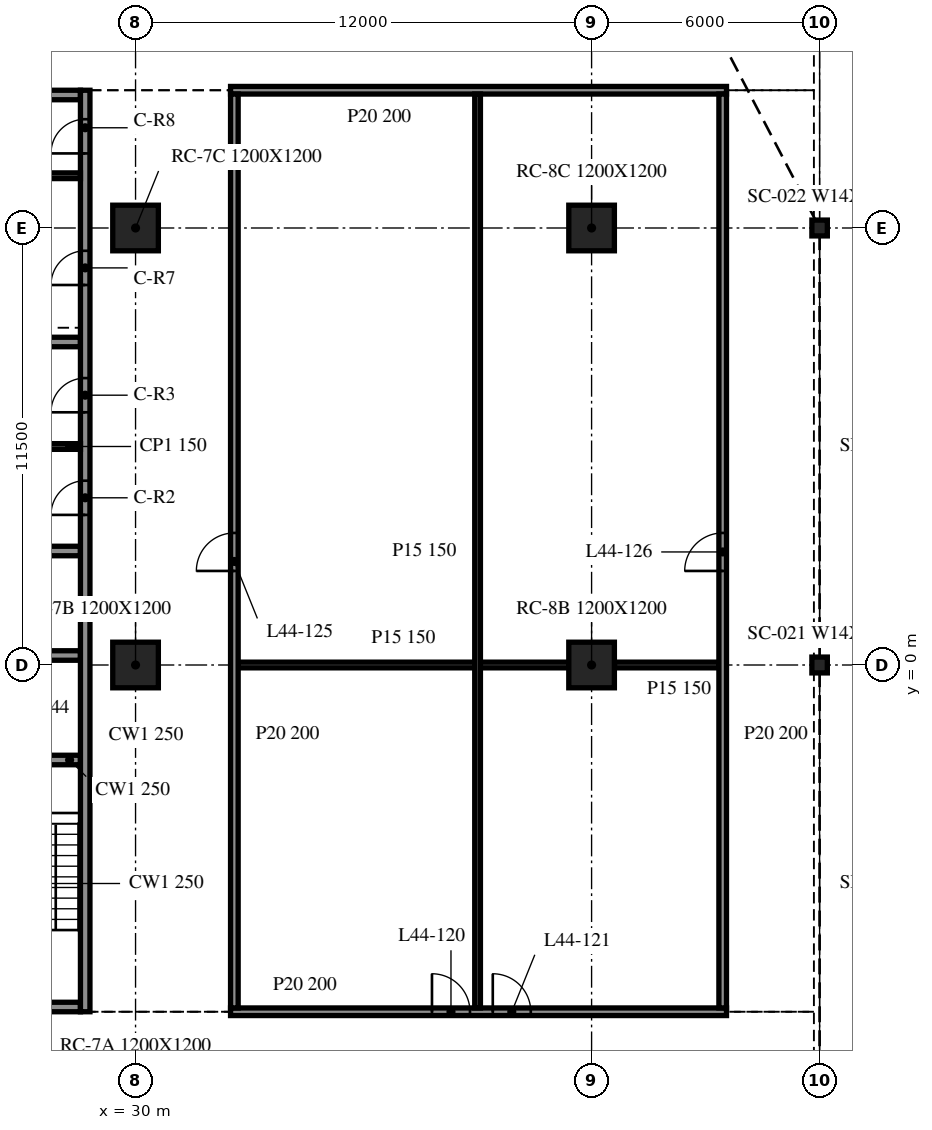
"""IFC4 building model, lengths in metres.
Left out: names, types, materials, properties, quantities, classifications, styles, units other than length and angle.
Written with IfcOpenShell. Run it as: python <this file> out.ifc"""

import sys

from ifc_helpers import new_model, si_unit, direction, frame, frame_2d, origin, origin_2d, place, context, subcontext, project, spatial, rectangle, i_section, extrude, element, fill, save


model = new_model("IFC4")
c1 = context("Model", 3, precision=1e-05, world=origin(), true_north=direction((0.0, 1.0)))
c2 = subcontext(c1, "Body", "Model", "MODEL_VIEW")
j1 = project(units=[si_unit("LENGTHUNIT", "METRE"), si_unit("PLANEANGLEUNIT", "RADIAN")], contexts=[c1])
p1 = place(None, origin())
s1 = spatial("IfcSite", under=j1, at=p1, CompositionType="ELEMENT")
p2 = place(p1, origin())
s2 = spatial("IfcBuilding", under=s1, at=p2, CompositionType="ELEMENT")
p3 = place(p2, frame((0.0, 0.0, 185.8)))
s3 = spatial("IfcBuildingStorey", under=s2, at=p3, CompositionType="ELEMENT", Elevation=185.8)
for number, where, z_axis, x_axis in (
    (1, (30.0, 0.0, -0.34), (0.0, 0.0, 1.0), (1.0, 0.0, 0.0)),
    (2, (30.0, 11.5, -0.34), (0.0, 0.0, 1.0), (1.0, 0.0, 0.0)),
    (3, (42.0, 0.0, -0.34), (0.0, 0.0, 1.0), (1.0, 0.0, 0.0)),
    (4, (42.0, 11.5, -0.34), (0.0, 0.0, 1.0), (1.0, 0.0, 0.0)),
):
    element("IfcColumn", number, at=place(p3, frame(where, z_axis=z_axis, x_axis=x_axis)), inside=s3, PredefinedType="COLUMN", context=c2, shape_type="SweptSolid", body=[
        extrude(rectangle(XDim=1.2, YDim=1.2, at=origin_2d()), origin(), (0.0, 0.0, 1.0), 3.74),
    ])
for number, where, z_axis, x_axis in (
    (5, (48.0, 0.0, -0.34), (0.0, 0.0, 1.0), (1.0, 0.0, 0.0)),
    (6, (48.0, 11.5, -0.34), (0.0, 0.0, 1.0), (1.0, 0.0, 0.0)),
):
    element("IfcColumn", number, at=place(p3, frame(where, z_axis=z_axis, x_axis=x_axis)), inside=s3, PredefinedType="COLUMN", context=c2, shape_type="SweptSolid", body=[
        extrude(i_section(OverallWidth=0.406, OverallDepth=0.417, WebThickness=0.03, FlangeThickness=0.048, at=origin_2d()), origin(), (0.0, 0.0, 1.0), 3.74),
    ])
p4 = place(p3, frame((28.675, -9.125, 0.0), z_axis=(0.0, 0.0, 1.0), x_axis=(0.0, 1.0, 0.0)))
e7 = element("IfcWall", 7, at=p4, inside=s3, PredefinedType="SOLIDWALL", context=c2, shape_type="SweptSolid", body=[
    extrude(rectangle(XDim=24.25, YDim=0.25, at=frame_2d((12.125, 0.0))), origin(), (0.0, 0.0, 1.0), 3.4),
])
p5 = place(p4, frame((13.075, 0.0, 0.0)))
e8 = element("IfcOpeningElement", 8, at=p5, cuts=e7, PredefinedType="OPENING", context=c2, shape_type="SweptSolid", body=[
    extrude(rectangle(XDim=0.9, YDim=2.1, at=frame_2d((0.45, 1.05))), frame((0.0, 0.135, 0.0), z_axis=(0.0, -1.0, 0.0), x_axis=(1.0, 0.0, 0.0)), (0.0, 0.0, 1.0), 0.27),
])
p6 = place(p4, frame((15.775, 0.0, 0.0)))
e9 = element("IfcOpeningElement", 9, at=p6, cuts=e7, PredefinedType="OPENING", context=c2, shape_type="SweptSolid", body=[
    extrude(rectangle(XDim=0.9, YDim=2.1, at=frame_2d((0.45, 1.05))), frame((0.0, 0.135, 0.0), z_axis=(0.0, -1.0, 0.0), x_axis=(1.0, 0.0, 0.0)), (0.0, 0.0, 1.0), 0.27),
])
p7 = place(p4, frame((19.125, 0.0, 0.0)))
e10 = element("IfcOpeningElement", 10, at=p7, cuts=e7, PredefinedType="OPENING", context=c2, shape_type="SweptSolid", body=[
    extrude(rectangle(XDim=0.9, YDim=2.1, at=frame_2d((0.45, 1.05))), frame((0.0, 0.135, 0.0), z_axis=(0.0, -1.0, 0.0), x_axis=(1.0, 0.0, 0.0)), (0.0, 0.0, 1.0), 0.27),
])
p8 = place(p4, frame((22.587, 0.0, 0.0)))
e11 = element("IfcOpeningElement", 11, at=p8, cuts=e7, PredefinedType="OPENING", context=c2, shape_type="SweptSolid", body=[
    extrude(rectangle(XDim=0.9, YDim=2.1, at=frame_2d((0.45, 1.05))), frame((0.0, 0.135, 0.0), z_axis=(0.0, -1.0, 0.0), x_axis=(1.0, 0.0, 0.0)), (0.0, 0.0, 1.0), 0.27),
])
p9 = place(p3, frame((28.55, -9.0, 0.0), z_axis=(0.0, 0.0, 1.0), x_axis=(-1.0, 0.0, 0.0)))
e12 = element("IfcWall", 12, at=p9, inside=s3, PredefinedType="SOLIDWALL", context=c2, shape_type="SweptSolid", body=[
    extrude(rectangle(XDim=9.1, YDim=0.25, at=frame_2d((4.55, 0.0))), origin(), (0.0, 0.0, 1.0), 3.4),
])
p10 = place(p9, frame((3.65, 0.0, 0.0)))
e13 = element("IfcOpeningElement", 13, at=p10, cuts=e12, PredefinedType="OPENING", context=c2, shape_type="SweptSolid", body=[
    extrude(rectangle(XDim=1.8, YDim=2.1, at=frame_2d((0.9, 1.05))), frame((0.0, 0.135, 0.0), z_axis=(0.0, -1.0, 0.0), x_axis=(1.0, 0.0, 0.0)), (0.0, 0.0, 1.0), 0.27),
])
p11 = place(p3, frame((19.45, 15.0, 0.0), z_axis=(0.0, 0.0, 1.0), x_axis=(1.0, 0.0, 0.0)))
e14 = element("IfcWall", 14, at=p11, inside=s3, PredefinedType="SOLIDWALL", context=c2, shape_type="SweptSolid", body=[
    extrude(rectangle(XDim=9.1, YDim=0.25, at=frame_2d((4.55, 0.0))), origin(), (0.0, 0.0, 1.0), 3.4),
])
p12 = place(p11, frame((3.65, 0.0, 0.0)))
e15 = element("IfcOpeningElement", 15, at=p12, cuts=e14, PredefinedType="OPENING", context=c2, shape_type="SweptSolid", body=[
    extrude(rectangle(XDim=1.8, YDim=2.1, at=frame_2d((0.9, 1.05))), frame((0.0, 0.135, 0.0), z_axis=(0.0, -1.0, 0.0), x_axis=(1.0, 0.0, 0.0)), (0.0, 0.0, 1.0), 0.27),
])
for number, where, z_axis, x_axis in (
    (16, (25.7, -2.5, 0.0), (0.0, 0.0, 1.0), (1.0, 0.0, 0.0)),
    (17, (25.7, 0.25, 0.0), (0.0, 0.0, 1.0), (1.0, 0.0, 0.0)),
    (18, (25.7, 3.0, 0.0), (0.0, 0.0, 1.0), (1.0, 0.0, 0.0)),
    (19, (25.7, 8.5, 0.0), (0.0, 0.0, 1.0), (1.0, 0.0, 0.0)),
):
    element("IfcWall", number, at=place(p3, frame(where, z_axis=z_axis, x_axis=x_axis)), inside=s3, PredefinedType="SOLIDWALL", context=c2, shape_type="SweptSolid", body=[
        extrude(rectangle(XDim=2.85, YDim=0.25, at=frame_2d((1.425, 0.0))), origin(), (0.0, 0.0, 1.0), 3.4),
    ])
for number, where, z_axis, x_axis in (
    (20, (25.7, 5.75, 0.0), (0.0, 0.0, 1.0), (1.0, 0.0, 0.0)),
    (21, (25.7, 12.875, 0.0), (0.0, 0.0, 1.0), (1.0, 0.0, 0.0)),
):
    element("IfcWall", number, at=place(p3, frame(where, z_axis=z_axis, x_axis=x_axis)), inside=s3, PredefinedType="PARTITIONING", context=c2, shape_type="SweptSolid", body=[
        extrude(rectangle(XDim=2.85, YDim=0.15, at=frame_2d((1.425, 0.0))), origin(), (0.0, 0.0, 1.0), 3.4),
    ])
p13 = place(p3, frame((32.5, -9.125, 0.0), z_axis=(0.0, 0.0, 1.0), x_axis=(1.0, 0.0, 0.0)))
e22 = element("IfcWall", 22, at=p13, inside=s3, PredefinedType="PARTITIONING", context=c2, shape_type="SweptSolid", body=[
    extrude(rectangle(XDim=13.05, YDim=0.2, at=frame_2d((6.525, 0.0))), origin(), (0.0, 0.0, 1.0), 3.4),
])
p14 = place(p13, frame((5.3, 0.0, 0.0)))
e23 = element("IfcOpeningElement", 23, at=p14, cuts=e22, PredefinedType="OPENING", context=c2, shape_type="SweptSolid", body=[
    extrude(rectangle(XDim=1.0, YDim=2.1, at=frame_2d((0.5, 1.05))), frame((0.0, 0.11, 0.0), z_axis=(0.0, -1.0, 0.0), x_axis=(1.0, 0.0, 0.0)), (0.0, 0.0, 1.0), 0.22),
])
p15 = place(p13, frame((6.9, 0.0, 0.0)))
e24 = element("IfcOpeningElement", 24, at=p15, cuts=e22, PredefinedType="OPENING", context=c2, shape_type="SweptSolid", body=[
    extrude(rectangle(XDim=1.0, YDim=2.1, at=frame_2d((0.5, 1.05))), frame((0.0, 0.11, 0.0), z_axis=(0.0, -1.0, 0.0), x_axis=(1.0, 0.0, 0.0)), (0.0, 0.0, 1.0), 0.22),
])
p16 = place(p3, frame((32.7, 0.0, 0.0), z_axis=(0.0, 0.0, 1.0), x_axis=(1.0, 0.0, 0.0)))
e25 = element("IfcWall", 25, at=p16, inside=s3, PredefinedType="PARTITIONING", context=c2, shape_type="SweptSolid", body=[
    extrude(rectangle(XDim=8.7, YDim=0.15, at=frame_2d((4.35, 0.0))), origin(), (0.0, 0.0, 1.0), 2.401),
])
p17 = place(p3, frame((42.6, 0.0, 0.0), z_axis=(0.0, 0.0, 1.0), x_axis=(1.0, 0.0, 0.0)))
e26 = element("IfcWall", 26, at=p17, inside=s3, PredefinedType="PARTITIONING", context=c2, shape_type="SweptSolid", body=[
    extrude(rectangle(XDim=2.75, YDim=0.15, at=frame_2d((1.375, 0.0))), origin(), (0.0, 0.0, 1.0), 2.401),
])
p18 = place(p3, frame((32.5, 15.125, 0.0), z_axis=(0.0, 0.0, 1.0), x_axis=(1.0, 0.0, 0.0)))
e27 = element("IfcWall", 27, at=p18, inside=s3, PredefinedType="PARTITIONING", context=c2, shape_type="SweptSolid", body=[
    extrude(rectangle(XDim=13.05, YDim=0.2, at=frame_2d((6.525, 0.0))), origin(), (0.0, 0.0, 1.0), 3.4),
])
p19 = place(p3, frame((32.6, -9.025, 0.0), z_axis=(0.0, 0.0, 1.0), x_axis=(0.0, 1.0, 0.0)))
e28 = element("IfcWall", 28, at=p19, inside=s3, PredefinedType="PARTITIONING", context=c2, shape_type="SweptSolid", body=[
    extrude(rectangle(XDim=24.05, YDim=0.2, at=frame_2d((12.025, 0.0))), origin(), (0.0, 0.0, 1.0), 3.4),
])
p20 = place(p19, frame((11.5, 0.0, 0.0)))
e29 = element("IfcOpeningElement", 29, at=p20, cuts=e28, PredefinedType="OPENING", context=c2, shape_type="SweptSolid", body=[
    extrude(rectangle(XDim=1.0, YDim=2.1, at=frame_2d((0.5, 1.05))), frame((0.0, 0.11, 0.0), z_axis=(0.0, -1.0, 0.0), x_axis=(1.0, 0.0, 0.0)), (0.0, 0.0, 1.0), 0.22),
])
p21 = place(p3, frame((39.0, -9.025, 0.0), z_axis=(0.0, 0.0, 1.0), x_axis=(0.0, 1.0, 0.0)))
e30 = element("IfcWall", 30, at=p21, inside=s3, PredefinedType="PARTITIONING", context=c2, shape_type="SweptSolid", body=[
    extrude(rectangle(XDim=24.05, YDim=0.15, at=frame_2d((12.025, 0.0))), origin(), (0.0, 0.0, 1.0), 3.4),
])
p22 = place(p3, frame((45.45, -9.025, 0.0), z_axis=(0.0, 0.0, 1.0), x_axis=(0.0, 1.0, 0.0)))
e31 = element("IfcWall", 31, at=p22, inside=s3, PredefinedType="PARTITIONING", context=c2, shape_type="SweptSolid", body=[
    extrude(rectangle(XDim=24.05, YDim=0.2, at=frame_2d((12.025, 0.0))), origin(), (0.0, 0.0, 1.0), 3.4),
])
p23 = place(p22, frame((11.5, 0.0, 0.0)))
e32 = element("IfcOpeningElement", 32, at=p23, cuts=e31, PredefinedType="OPENING", context=c2, shape_type="SweptSolid", body=[
    extrude(rectangle(XDim=1.0, YDim=2.1, at=frame_2d((0.5, 1.05))), frame((0.0, 0.11, 0.0), z_axis=(0.0, -1.0, 0.0), x_axis=(1.0, 0.0, 0.0)), (0.0, 0.0, 1.0), 0.22),
])
p24 = place(p5, origin())
e33 = element("IfcDoor", 33, at=p24, inside=s3, OperationType="SINGLE_SWING_RIGHT", PredefinedType="DOOR", context=c2, shape_type="SweptSolid", body=[
    extrude(rectangle(XDim=0.9, YDim=2.1, at=frame_2d((0.45, 1.05))), frame((0.0, 0.025, 0.0), z_axis=(0.0, -1.0, 0.0), x_axis=(1.0, 0.0, 0.0)), (0.0, 0.0, 1.0), 0.05),
])
fill(e8, e33)
p25 = place(p6, origin())
e34 = element("IfcDoor", 34, at=p25, inside=s3, OperationType="SINGLE_SWING_LEFT", PredefinedType="DOOR", context=c2, shape_type="SweptSolid", body=[
    extrude(rectangle(XDim=0.9, YDim=2.1, at=frame_2d((0.45, 1.05))), frame((0.0, 0.025, 0.0), z_axis=(0.0, -1.0, 0.0), x_axis=(1.0, 0.0, 0.0)), (0.0, 0.0, 1.0), 0.05),
])
fill(e9, e34)
p26 = place(p7, origin())
e35 = element("IfcDoor", 35, at=p26, inside=s3, OperationType="SINGLE_SWING_LEFT", PredefinedType="DOOR", context=c2, shape_type="SweptSolid", body=[
    extrude(rectangle(XDim=0.9, YDim=2.1, at=frame_2d((0.45, 1.05))), frame((0.0, 0.025, 0.0), z_axis=(0.0, -1.0, 0.0), x_axis=(1.0, 0.0, 0.0)), (0.0, 0.0, 1.0), 0.05),
])
fill(e10, e35)
p27 = place(p8, origin())
e36 = element("IfcDoor", 36, at=p27, inside=s3, OperationType="SINGLE_SWING_RIGHT", PredefinedType="DOOR", context=c2, shape_type="SweptSolid", body=[
    extrude(rectangle(XDim=0.9, YDim=2.1, at=frame_2d((0.45, 1.05))), frame((0.0, 0.025, 0.0), z_axis=(0.0, -1.0, 0.0), x_axis=(1.0, 0.0, 0.0)), (0.0, 0.0, 1.0), 0.05),
])
fill(e11, e36)
p28 = place(p14, origin())
e37 = element("IfcDoor", 37, at=p28, inside=s3, OperationType="SINGLE_SWING_LEFT", PredefinedType="DOOR", context=c2, shape_type="SweptSolid", body=[
    extrude(rectangle(XDim=1.0, YDim=2.1, at=frame_2d((0.5, 1.05))), frame((0.0, 0.025, 0.0), z_axis=(0.0, -1.0, 0.0), x_axis=(1.0, 0.0, 0.0)), (0.0, 0.0, 1.0), 0.05),
])
fill(e23, e37)
p29 = place(p15, origin())
e38 = element("IfcDoor", 38, at=p29, inside=s3, OperationType="SINGLE_SWING_RIGHT", PredefinedType="DOOR", context=c2, shape_type="SweptSolid", body=[
    extrude(rectangle(XDim=1.0, YDim=2.1, at=frame_2d((0.5, 1.05))), frame((0.0, 0.025, 0.0), z_axis=(0.0, -1.0, 0.0), x_axis=(1.0, 0.0, 0.0)), (0.0, 0.0, 1.0), 0.05),
])
fill(e24, e38)
p30 = place(p20, origin())
e39 = element("IfcDoor", 39, at=p30, inside=s3, OperationType="SINGLE_SWING_RIGHT", PredefinedType="DOOR", context=c2, shape_type="SweptSolid", body=[
    extrude(rectangle(XDim=1.0, YDim=2.1, at=frame_2d((0.5, 1.05))), frame((0.0, 0.025, 0.0), z_axis=(0.0, -1.0, 0.0), x_axis=(1.0, 0.0, 0.0)), (0.0, 0.0, 1.0), 0.05),
])
fill(e29, e39)
p31 = place(p23, origin())
e40 = element("IfcDoor", 40, at=p31, inside=s3, OperationType="SINGLE_SWING_LEFT", PredefinedType="DOOR", context=c2, shape_type="SweptSolid", body=[
    extrude(rectangle(XDim=1.0, YDim=2.1, at=frame_2d((0.5, 1.05))), frame((0.0, 0.025, 0.0), z_axis=(0.0, -1.0, 0.0), x_axis=(1.0, 0.0, 0.0)), (0.0, 0.0, 1.0), 0.05),
])
fill(e32, e40)
save(model, sys.argv[1])
